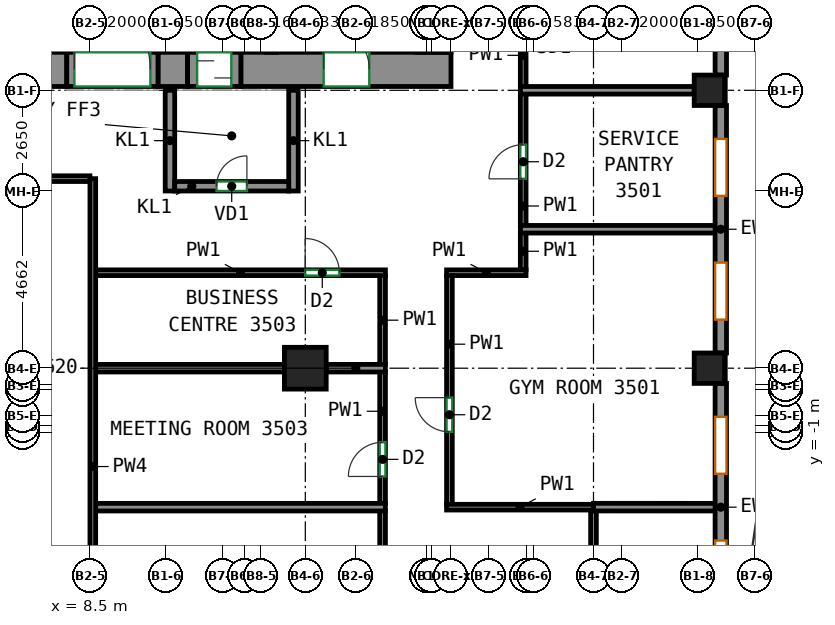
"""IFC4 building model, lengths in metres.
Left out: names, types, materials, properties, quantities, classifications, styles, units other than length and angle.
Written with IfcOpenShell. Run it as: python <this file> out.ifc"""

import sys

from ifc_helpers import new_model, si_unit, direction, frame, frame_2d, origin, origin_2d, place, context, subcontext, project, spatial, rectangle, extrude, source, transform, mapped, element, fill, save


model = new_model("IFC4")
c1 = context("Model", 3, precision=1e-05, world=origin(), true_north=direction((0.0, 1.0)))
c2 = subcontext(c1, "Body", "Model", "MODEL_VIEW")
j1 = project(units=[si_unit("LENGTHUNIT", "METRE"), si_unit("PLANEANGLEUNIT", "RADIAN")], contexts=[c1])
p1 = place(None, origin())
s1 = spatial("IfcSite", under=j1, at=p1, CompositionType="ELEMENT")
p2 = place(p1, origin())
s2 = spatial("IfcBuilding", under=s1, at=p2, CompositionType="ELEMENT")
p3 = place(p2, frame((0.0, 0.0, 154.1)))
s3 = spatial("IfcBuildingStorey", under=s2, at=p3, CompositionType="ELEMENT", Elevation=154.1)
m1 = source(origin(), c2, "Body", "SweptSolid", [
    extrude(rectangle(XDim=1.1, YDim=1.1, at=origin_2d()), origin(), (0.0, 0.0, 1.0), 3.12),
])
p4 = place(p3, frame((14.167, 0.688, 0.0), z_axis=(0.0, 0.0, 1.0), x_axis=(1.0, 0.0, 0.0)))
e1 = element("IfcColumn", 1, at=p4, inside=s3, PredefinedType="COLUMN", context=c2, shape_type="MappedRepresentation", body=[
    mapped(m1, transform((0.0, 0.0, 0.0))),
])
m2 = source(origin(), c2, "Body", "SweptSolid", [
    extrude(rectangle(XDim=0.8, YDim=0.8, at=origin_2d()), origin(), (0.0, 0.0, 1.0), 3.12),
])
for number, where, z_axis, x_axis in (
    (2, (24.8, 0.688, 0.0), (0.0, 0.0, 1.0), (1.0, 0.0, 0.0)),
    (3, (24.8, 8.0, 0.0), (0.0, 0.0, 1.0), (1.0, 0.0, 0.0)),
):
    element("IfcColumn", number, at=place(p3, frame(where, z_axis=z_axis, x_axis=x_axis)), inside=s3, PredefinedType="COLUMN", context=c2, shape_type="MappedRepresentation", body=[
        mapped(m2, transform((0.0, 0.0, 0.0))),
    ])
m3 = source(origin(), c2, "Body", "SweptSolid", [
    extrude(rectangle(XDim=14.18, YDim=0.9, at=frame_2d((7.09, 0.0))), origin(), (0.0, 0.0, 1.0), 3.12),
])
p5 = place(p3, frame((-6.29, 8.55, 0.0), z_axis=(0.0, 0.0, 1.0), x_axis=(1.0, 0.0, 0.0)))
e4 = element("IfcWall", 4, at=p5, inside=s3, PredefinedType="SHEAR", context=c2, shape_type="MappedRepresentation", body=[
    mapped(m3, transform((0.0, 0.0, 0.0))),
])
m4 = source(origin(), c2, "Body", "SweptSolid", [
    extrude(rectangle(XDim=0.78, YDim=0.9, at=frame_2d((0.39, 0.0))), origin(), (0.0, 0.0, 1.0), 3.12),
])
p6 = place(p3, frame((10.29, 8.55, 0.0), z_axis=(0.0, 0.0, 1.0), x_axis=(1.0, 0.0, 0.0)))
e5 = element("IfcWall", 5, at=p6, inside=s3, PredefinedType="SHEAR", context=c2, shape_type="MappedRepresentation", body=[
    mapped(m4, transform((0.0, 0.0, 0.0))),
])
m5 = source(origin(), c2, "Body", "SweptSolid", [
    extrude(rectangle(XDim=5.53, YDim=0.9, at=frame_2d((2.765, 0.0))), origin(), (0.0, 0.0, 1.0), 3.12),
])
p7 = place(p3, frame((12.47, 8.55, 0.0), z_axis=(0.0, 0.0, 1.0), x_axis=(1.0, 0.0, 0.0)))
e6 = element("IfcWall", 6, at=p7, inside=s3, PredefinedType="SHEAR", context=c2, shape_type="MappedRepresentation", body=[
    mapped(m5, transform((0.0, 0.0, 0.0))),
])
p8 = place(p7, frame((2.18, 0.0, 0.0)))
e7 = element("IfcOpeningElement", 7, at=p8, cuts=e6, PredefinedType="OPENING", context=c2, shape_type="SweptSolid", body=[
    extrude(rectangle(XDim=1.2, YDim=2.1, at=frame_2d((0.6, 1.05))), frame((0.0, 0.46, 0.0), z_axis=(0.0, -1.0, 0.0), x_axis=(1.0, 0.0, 0.0)), (0.0, 0.0, 1.0), 0.92),
])
m6 = source(origin(), c2, "Body", "SweptSolid", [
    extrude(rectangle(XDim=6.513, YDim=0.3, at=frame_2d((3.256, 0.0))), origin(), (0.0, 0.0, 1.0), 3.12),
])
p9 = place(p3, frame((25.1, -6.225, 0.0), z_axis=(0.0, 0.0, 1.0), x_axis=(0.0, 1.0, 0.0)))
e8 = element("IfcWall", 8, at=p9, inside=s3, PredefinedType="SOLIDWALL", context=c2, shape_type="MappedRepresentation", body=[
    mapped(m6, transform((0.0, 0.0, 0.0))),
])
p10 = place(p9, frame((0.878, 0.0, 0.85)))
e9 = element("IfcOpeningElement", 9, at=p10, cuts=e8, PredefinedType="OPENING", context=c2, shape_type="SweptSolid", body=[
    extrude(rectangle(XDim=1.5, YDim=1.95, at=frame_2d((0.75, 0.975))), frame((0.0, 0.16, 0.0), z_axis=(0.0, -1.0, 0.0), x_axis=(1.0, 0.0, 0.0)), (0.0, 0.0, 1.0), 0.32),
])
p11 = place(p9, frame((4.135, 0.0, 0.85)))
e10 = element("IfcOpeningElement", 10, at=p11, cuts=e8, PredefinedType="OPENING", context=c2, shape_type="SweptSolid", body=[
    extrude(rectangle(XDim=1.5, YDim=1.95, at=frame_2d((0.75, 0.975))), frame((0.0, 0.16, 0.0), z_axis=(0.0, -1.0, 0.0), x_axis=(1.0, 0.0, 0.0)), (0.0, 0.0, 1.0), 0.32),
])
p12 = place(p3, frame((25.1, 1.087, 0.0), z_axis=(0.0, 0.0, 1.0), x_axis=(0.0, 1.0, 0.0)))
e11 = element("IfcWall", 11, at=p12, inside=s3, PredefinedType="SOLIDWALL", context=c2, shape_type="MappedRepresentation", body=[
    mapped(m6, transform((0.0, 0.0, 0.0))),
])
p13 = place(p12, frame((0.878, 0.0, 0.85)))
e12 = element("IfcOpeningElement", 12, at=p13, cuts=e11, PredefinedType="OPENING", context=c2, shape_type="SweptSolid", body=[
    extrude(rectangle(XDim=1.5, YDim=1.95, at=frame_2d((0.75, 0.975))), frame((0.0, 0.16, 0.0), z_axis=(0.0, -1.0, 0.0), x_axis=(1.0, 0.0, 0.0)), (0.0, 0.0, 1.0), 0.32),
])
p14 = place(p12, frame((4.135, 0.0, 0.85)))
e13 = element("IfcOpeningElement", 13, at=p14, cuts=e11, PredefinedType="OPENING", context=c2, shape_type="SweptSolid", body=[
    extrude(rectangle(XDim=1.5, YDim=1.95, at=frame_2d((0.75, 0.975))), frame((0.0, 0.16, 0.0), z_axis=(0.0, -1.0, 0.0), x_axis=(1.0, 0.0, 0.0)), (0.0, 0.0, 1.0), 0.32),
])
m7 = source(origin(), c2, "Body", "SweptSolid", [
    extrude(rectangle(XDim=13.2, YDim=0.3, at=frame_2d((6.6, 0.0))), origin(), (0.0, 0.0, 1.0), 3.12),
])
p15 = place(p3, frame((25.1, 8.4, 0.0), z_axis=(0.0, 0.0, 1.0), x_axis=(0.0, 1.0, 0.0)))
e14 = element("IfcWall", 14, at=p15, inside=s3, PredefinedType="SOLIDWALL", context=c2, shape_type="MappedRepresentation", body=[
    mapped(m7, transform((0.0, 0.0, 0.0))),
])
p16 = place(p15, frame((0.9, 0.0, 0.85)))
e15 = element("IfcOpeningElement", 15, at=p16, cuts=e14, PredefinedType="OPENING", context=c2, shape_type="SweptSolid", body=[
    extrude(rectangle(XDim=1.5, YDim=1.95, at=frame_2d((0.75, 0.975))), frame((0.0, 0.16, 0.0), z_axis=(0.0, -1.0, 0.0), x_axis=(1.0, 0.0, 0.0)), (0.0, 0.0, 1.0), 0.32),
])
p17 = place(p15, frame((4.2, 0.0, 0.85)))
e16 = element("IfcOpeningElement", 16, at=p17, cuts=e14, PredefinedType="OPENING", context=c2, shape_type="SweptSolid", body=[
    extrude(rectangle(XDim=1.5, YDim=1.95, at=frame_2d((0.75, 0.975))), frame((0.0, 0.16, 0.0), z_axis=(0.0, -1.0, 0.0), x_axis=(1.0, 0.0, 0.0)), (0.0, 0.0, 1.0), 0.32),
])
p18 = place(p15, frame((7.5, 0.0, 0.85)))
e17 = element("IfcOpeningElement", 17, at=p18, cuts=e14, PredefinedType="OPENING", context=c2, shape_type="SweptSolid", body=[
    extrude(rectangle(XDim=1.5, YDim=1.95, at=frame_2d((0.75, 0.975))), frame((0.0, 0.16, 0.0), z_axis=(0.0, -1.0, 0.0), x_axis=(1.0, 0.0, 0.0)), (0.0, 0.0, 1.0), 0.32),
])
p19 = place(p15, frame((10.8, 0.0, 0.85)))
e18 = element("IfcOpeningElement", 18, at=p19, cuts=e14, PredefinedType="OPENING", context=c2, shape_type="SweptSolid", body=[
    extrude(rectangle(XDim=1.5, YDim=1.95, at=frame_2d((0.75, 0.975))), frame((0.0, 0.16, 0.0), z_axis=(0.0, -1.0, 0.0), x_axis=(1.0, 0.0, 0.0)), (0.0, 0.0, 1.0), 0.32),
])
m8 = source(origin(), c2, "Body", "SweptSolid", [
    extrude(rectangle(XDim=2.65, YDim=0.25, at=frame_2d((1.325, 0.0))), origin(), (0.0, 0.0, 1.0), 3.12),
])
for number, where, z_axis, x_axis in (
    (19, (10.605, 5.35, 0.0), (0.0, 0.0, 1.0), (0.0, 1.0, 0.0)),
    (20, (13.855, 5.35, 0.0), (0.0, 0.0, 1.0), (0.0, 1.0, 0.0)),
):
    element("IfcWall", number, at=place(p3, frame(where, z_axis=z_axis, x_axis=x_axis)), inside=s3, PredefinedType="PARTITIONING", context=c2, shape_type="MappedRepresentation", body=[
        mapped(m8, transform((0.0, 0.0, 0.0))),
    ])
m9 = source(origin(), c2, "Body", "SweptSolid", [
    extrude(rectangle(XDim=3.0, YDim=0.25, at=frame_2d((1.5, 0.0))), origin(), (0.0, 0.0, 1.0), 3.12),
])
p20 = place(p3, frame((10.73, 5.475, 0.0), z_axis=(0.0, 0.0, 1.0), x_axis=(1.0, 0.0, 0.0)))
e21 = element("IfcWall", 21, at=p20, inside=s3, PredefinedType="PARTITIONING", context=c2, shape_type="MappedRepresentation", body=[
    mapped(m9, transform((0.0, 0.0, 0.0))),
])
p21 = place(p20, frame((1.1, 0.0, 0.0)))
e22 = element("IfcOpeningElement", 22, at=p21, cuts=e21, PredefinedType="OPENING", context=c2, shape_type="SweptSolid", body=[
    extrude(rectangle(XDim=0.8, YDim=2.0, at=frame_2d((0.4, 1.0))), frame((0.0, 0.135, 0.0), z_axis=(0.0, -1.0, 0.0), x_axis=(1.0, 0.0, 0.0)), (0.0, 0.0, 1.0), 0.27),
])
m10 = source(origin(), c2, "Body", "SweptSolid", [
    extrude(rectangle(XDim=2.4, YDim=0.9, at=frame_2d((1.2, 0.0))), origin(), (0.0, 0.0, 1.0), 2.7),
])
p22 = place(p3, frame((7.89, 8.55, 0.0), z_axis=(0.0, 0.0, 1.0), x_axis=(1.0, 0.0, 0.0)))
e23 = element("IfcWall", 23, at=p22, inside=s3, PredefinedType="PARTITIONING", context=c2, shape_type="MappedRepresentation", body=[
    mapped(m10, transform((0.0, 0.0, 0.0))),
])
p23 = place(p22, frame((0.2, 0.0, 0.0)))
e24 = element("IfcOpeningElement", 24, at=p23, cuts=e23, PredefinedType="OPENING", context=c2, shape_type="SweptSolid", body=[
    extrude(rectangle(XDim=2.0, YDim=2.1, at=frame_2d((1.0, 1.05))), frame((0.0, 0.46, 0.0), z_axis=(0.0, -1.0, 0.0), x_axis=(1.0, 0.0, 0.0)), (0.0, 0.0, 1.0), 0.92),
])
m11 = source(origin(), c2, "Body", "SweptSolid", [
    extrude(rectangle(XDim=1.4, YDim=0.9, at=frame_2d((0.7, 0.0))), origin(), (0.0, 0.0, 1.0), 2.7),
])
p24 = place(p3, frame((11.07, 8.55, 0.0), z_axis=(0.0, 0.0, 1.0), x_axis=(1.0, 0.0, 0.0)))
e25 = element("IfcWall", 25, at=p24, inside=s3, PredefinedType="PARTITIONING", context=c2, shape_type="MappedRepresentation", body=[
    mapped(m11, transform((0.0, 0.0, 0.0))),
])
p25 = place(p24, frame((0.25, 0.0, 0.0)))
e26 = element("IfcOpeningElement", 26, at=p25, cuts=e25, PredefinedType="OPENING", context=c2, shape_type="SweptSolid", body=[
    extrude(rectangle(XDim=0.9, YDim=2.1, at=frame_2d((0.45, 1.05))), frame((0.0, 0.46, 0.0), z_axis=(0.0, -1.0, 0.0), x_axis=(1.0, 0.0, 0.0)), (0.0, 0.0, 1.0), 0.92),
])
p26 = place(p3, frame((19.9, 4.434, 0.0), z_axis=(0.0, 0.0, 1.0), x_axis=(0.0, 1.0, 0.0)))
e27 = element("IfcWall", 27, at=p26, inside=s3, PredefinedType="PARTITIONING", context=c2, shape_type="SweptSolid", body=[
    extrude(rectangle(XDim=3.476, YDim=0.15, at=frame_2d((1.738, 0.0))), origin(), (0.0, 0.0, 1.0), 3.12),
])
p27 = place(p26, frame((1.236, 0.0, 0.0)))
e28 = element("IfcOpeningElement", 28, at=p27, cuts=e27, PredefinedType="OPENING", context=c2, shape_type="SweptSolid", body=[
    extrude(rectangle(XDim=0.9, YDim=2.1, at=frame_2d((0.45, 1.05))), frame((0.0, 0.085, 0.0), z_axis=(0.0, -1.0, 0.0), x_axis=(1.0, 0.0, 0.0)), (0.0, 0.0, 1.0), 0.17),
])
p28 = place(p3, frame((19.9, 8.09, 0.0), z_axis=(0.0, 0.0, 1.0), x_axis=(0.0, 1.0, 0.0)))
e29 = element("IfcWall", 29, at=p28, inside=s3, PredefinedType="PARTITIONING", context=c2, shape_type="SweptSolid", body=[
    extrude(rectangle(XDim=1.66, YDim=0.15, at=frame_2d((0.83, 0.0))), origin(), (0.0, 0.0, 1.0), 3.12),
])
p29 = place(p3, frame((19.9, 3.275, 0.0), z_axis=(0.0, 0.0, 1.0), x_axis=(0.0, 1.0, 0.0)))
e30 = element("IfcWall", 30, at=p29, inside=s3, PredefinedType="PARTITIONING", context=c2, shape_type="SweptSolid", body=[
    extrude(rectangle(XDim=0.979, YDim=0.15, at=frame_2d((0.49, 0.0))), origin(), (0.0, 0.0, 1.0), 3.12),
])
p30 = place(p3, frame((17.884, 3.2, 0.0), z_axis=(0.0, 0.0, 1.0), x_axis=(1.0, 0.0, 0.0)))
e31 = element("IfcWall", 31, at=p30, inside=s3, PredefinedType="PARTITIONING", context=c2, shape_type="SweptSolid", body=[
    extrude(rectangle(XDim=2.091, YDim=0.15, at=frame_2d((1.045, 0.0))), origin(), (0.0, 0.0, 1.0), 3.12),
])
p31 = place(p3, frame((17.959, -2.894, 0.0), z_axis=(0.0, 0.0, 1.0), x_axis=(0.0, 1.0, 0.0)))
e32 = element("IfcWall", 32, at=p31, inside=s3, PredefinedType="PARTITIONING", context=c2, shape_type="SweptSolid", body=[
    extrude(rectangle(XDim=6.019, YDim=0.15, at=frame_2d((3.01, 0.0))), origin(), (0.0, 0.0, 1.0), 3.12),
])
p32 = place(p31, frame((1.907, 0.0, 0.0)))
e33 = element("IfcOpeningElement", 33, at=p32, cuts=e32, PredefinedType="OPENING", context=c2, shape_type="SweptSolid", body=[
    extrude(rectangle(XDim=0.9, YDim=2.1, at=frame_2d((0.45, 1.05))), frame((0.0, 0.085, 0.0), z_axis=(0.0, -1.0, 0.0), x_axis=(1.0, 0.0, 0.0)), (0.0, 0.0, 1.0), 0.17),
])
p33 = place(p3, frame((21.751, -2.969, 0.0), z_axis=(0.0, 0.0, 1.0), x_axis=(-1.0, 0.0, 0.0)))
e34 = element("IfcWall", 34, at=p33, inside=s3, PredefinedType="PARTITIONING", context=c2, shape_type="SweptSolid", body=[
    extrude(rectangle(XDim=3.867, YDim=0.15, at=frame_2d((1.934, 0.0))), origin(), (0.0, 0.0, 1.0), 3.12),
])
p34 = place(p3, frame((21.75, -7.75, 0.0), z_axis=(0.0, 0.0, 1.0), x_axis=(0.0, 1.0, 0.0)))
e35 = element("IfcWall", 35, at=p34, inside=s3, PredefinedType="PARTITIONING", context=c2, shape_type="SweptSolid", body=[
    extrude(rectangle(XDim=4.682, YDim=0.15, at=frame_2d((2.341, 0.0))), origin(), (0.0, 0.0, 1.0), 3.12),
])
p35 = place(p34, frame((1.602, 0.0, 0.0)))
e36 = element("IfcOpeningElement", 36, at=p35, cuts=e35, PredefinedType="OPENING", context=c2, shape_type="SweptSolid", body=[
    extrude(rectangle(XDim=0.9, YDim=2.1, at=frame_2d((0.45, 1.05))), frame((0.0, 0.085, 0.0), z_axis=(0.0, -1.0, 0.0), x_axis=(1.0, 0.0, 0.0)), (0.0, 0.0, 1.0), 0.17),
])
p36 = place(p3, frame((16.2, -11.425, 0.0), z_axis=(0.0, 0.0, 1.0), x_axis=(0.0, 1.0, 0.0)))
e37 = element("IfcWall", 37, at=p36, inside=s3, PredefinedType="PARTITIONING", context=c2, shape_type="SweptSolid", body=[
    extrude(rectangle(XDim=8.366, YDim=0.15, at=frame_2d((4.183, 0.0))), origin(), (0.0, 0.0, 1.0), 3.12),
])
p37 = place(p36, frame((3.935, 0.0, 0.0)))
e38 = element("IfcOpeningElement", 38, at=p37, cuts=e37, PredefinedType="OPENING", context=c2, shape_type="SweptSolid", body=[
    extrude(rectangle(XDim=0.9, YDim=2.1, at=frame_2d((0.45, 1.05))), frame((0.0, 0.085, 0.0), z_axis=(0.0, -1.0, 0.0), x_axis=(1.0, 0.0, 0.0)), (0.0, 0.0, 1.0), 0.17),
])
p38 = place(p3, frame((16.2, -2.879, 0.0), z_axis=(0.0, 0.0, 1.0), x_axis=(0.0, 1.0, 0.0)))
e39 = element("IfcWall", 39, at=p38, inside=s3, PredefinedType="PARTITIONING", context=c2, shape_type="SweptSolid", body=[
    extrude(rectangle(XDim=3.477, YDim=0.15, at=frame_2d((1.738, 0.0))), origin(), (0.0, 0.0, 1.0), 3.12),
])
p39 = place(p38, frame((0.718, 0.0, 0.0)))
e40 = element("IfcOpeningElement", 40, at=p39, cuts=e39, PredefinedType="OPENING", context=c2, shape_type="SweptSolid", body=[
    extrude(rectangle(XDim=0.9, YDim=2.1, at=frame_2d((0.45, 1.05))), frame((0.0, 0.085, 0.0), z_axis=(0.0, -1.0, 0.0), x_axis=(1.0, 0.0, 0.0)), (0.0, 0.0, 1.0), 0.17),
])
p40 = place(p3, frame((16.2, 0.778, 0.0), z_axis=(0.0, 0.0, 1.0), x_axis=(0.0, 1.0, 0.0)))
e41 = element("IfcWall", 41, at=p40, inside=s3, PredefinedType="PARTITIONING", context=c2, shape_type="SweptSolid", body=[
    extrude(rectangle(XDim=2.347, YDim=0.15, at=frame_2d((1.173, 0.0))), origin(), (0.0, 0.0, 1.0), 3.12),
])
p41 = place(p3, frame((8.65, 3.2, 0.0), z_axis=(0.0, 0.0, 1.0), x_axis=(1.0, 0.0, 0.0)))
e42 = element("IfcWall", 42, at=p41, inside=s3, PredefinedType="PARTITIONING", context=c2, shape_type="SweptSolid", body=[
    extrude(rectangle(XDim=7.625, YDim=0.15, at=frame_2d((3.812, 0.0))), origin(), (0.0, 0.0, 1.0), 3.12),
])
p42 = place(p41, frame((5.513, 0.0, 0.0)))
e43 = element("IfcOpeningElement", 43, at=p42, cuts=e42, PredefinedType="OPENING", context=c2, shape_type="SweptSolid", body=[
    extrude(rectangle(XDim=0.9, YDim=2.1, at=frame_2d((0.45, 1.05))), frame((0.0, 0.085, 0.0), z_axis=(0.0, -1.0, 0.0), x_axis=(1.0, 0.0, 0.0)), (0.0, 0.0, 1.0), 0.17),
])
p43 = place(p3, frame((19.827, 8.0, 0.0), z_axis=(0.0, 0.0, 1.0), x_axis=(1.0, 0.0, 0.0)))
e44 = element("IfcWall", 44, at=p43, inside=s3, PredefinedType="PARTITIONING", context=c2, shape_type="SweptSolid", body=[
    extrude(rectangle(XDim=4.573, YDim=0.2, at=frame_2d((2.287, 0.0))), origin(), (0.0, 0.0, 1.0), 3.12),
])
p44 = place(p3, frame((19.827, 4.344, 0.0), z_axis=(0.0, 0.0, 1.0), x_axis=(1.0, 0.0, 0.0)))
e45 = element("IfcWall", 45, at=p44, inside=s3, PredefinedType="PARTITIONING", context=c2, shape_type="SweptSolid", body=[
    extrude(rectangle(XDim=5.173, YDim=0.2, at=frame_2d((2.586, 0.0))), origin(), (0.0, 0.0, 1.0), 3.12),
])
p45 = place(p3, frame((21.751, -2.968, 0.0), z_axis=(0.0, 0.0, 1.0), x_axis=(0.999999954829, -0.000300571071, 0.0)))
e46 = element("IfcWall", 46, at=p45, inside=s3, PredefinedType="PARTITIONING", context=c2, shape_type="SweptSolid", body=[
    extrude(rectangle(XDim=3.249, YDim=0.2, at=frame_2d((1.625, 0.0))), origin(), (0.0, 0.0, 1.0), 3.12),
])
p46 = place(p3, frame((8.65, -2.969, 0.0), z_axis=(0.0, 0.0, 1.0), x_axis=(1.0, 0.0, 0.0)))
e47 = element("IfcWall", 47, at=p46, inside=s3, PredefinedType="PARTITIONING", context=c2, shape_type="SweptSolid", body=[
    extrude(rectangle(XDim=7.623, YDim=0.2, at=frame_2d((3.812, 0.0))), origin(), (0.0, 0.0, 1.0), 3.12),
])
p47 = place(p3, frame((14.717, 0.688, 0.0), z_axis=(0.0, 0.0, 1.0), x_axis=(1.0, 0.0, 0.0)))
e48 = element("IfcWall", 48, at=p47, inside=s3, PredefinedType="PARTITIONING", context=c2, shape_type="SweptSolid", body=[
    extrude(rectangle(XDim=1.556, YDim=0.2, at=frame_2d((0.778, 0.0))), origin(), (0.0, 0.0, 1.0), 2.52),
])
p48 = place(p3, frame((8.65, 0.688, 0.0), z_axis=(0.0, 0.0, 1.0), x_axis=(1.0, 0.0, 0.0)))
e49 = element("IfcWall", 49, at=p48, inside=s3, PredefinedType="PARTITIONING", context=c2, shape_type="SweptSolid", body=[
    extrude(rectangle(XDim=4.967, YDim=0.2, at=frame_2d((2.483, 0.0))), origin(), (0.0, 0.0, 1.0), 3.12),
])
p49 = place(p3, frame((-6.575, 5.675, 0.0), z_axis=(0.0, 0.0, 1.0), x_axis=(1.0, 0.0, 0.0)))
e50 = element("IfcWall", 50, at=p49, inside=s3, PredefinedType="PARTITIONING", context=c2, shape_type="SweptSolid", body=[
    extrude(rectangle(XDim=15.075, YDim=0.15, at=frame_2d((7.538, 0.0))), origin(), (0.0, 0.0, 1.0), 3.12),
])
p50 = place(p3, frame((8.575, 5.675, 0.0), z_axis=(0.0, 0.0, 1.0), x_axis=(0.0, -1.0, 0.0)))
e51 = element("IfcWall", 51, at=p50, inside=s3, PredefinedType="PARTITIONING", context=c2, shape_type="SweptSolid", body=[
    extrude(rectangle(XDim=15.15, YDim=0.15, at=frame_2d((7.575, 0.0))), origin(), (0.0, 0.0, 1.0), 3.12),
])
p51 = place(p10, origin())
e52 = element("IfcWindow", 52, at=p51, inside=s3, PartitioningType="SINGLE_PANEL", PredefinedType="WINDOW", context=c2, shape_type="SweptSolid", body=[
    extrude(rectangle(XDim=1.5, YDim=1.95, at=frame_2d((0.75, 0.975))), frame((0.0, 0.03, 0.0), z_axis=(0.0, -1.0, 0.0), x_axis=(1.0, 0.0, 0.0)), (0.0, 0.0, 1.0), 0.06),
])
fill(e9, e52)
p52 = place(p11, origin())
e53 = element("IfcWindow", 53, at=p52, inside=s3, PartitioningType="SINGLE_PANEL", PredefinedType="WINDOW", context=c2, shape_type="SweptSolid", body=[
    extrude(rectangle(XDim=1.5, YDim=1.95, at=frame_2d((0.75, 0.975))), frame((0.0, 0.03, 0.0), z_axis=(0.0, -1.0, 0.0), x_axis=(1.0, 0.0, 0.0)), (0.0, 0.0, 1.0), 0.06),
])
fill(e10, e53)
p53 = place(p13, origin())
e54 = element("IfcWindow", 54, at=p53, inside=s3, PartitioningType="SINGLE_PANEL", PredefinedType="WINDOW", context=c2, shape_type="SweptSolid", body=[
    extrude(rectangle(XDim=1.5, YDim=1.95, at=frame_2d((0.75, 0.975))), frame((0.0, 0.03, 0.0), z_axis=(0.0, -1.0, 0.0), x_axis=(1.0, 0.0, 0.0)), (0.0, 0.0, 1.0), 0.06),
])
fill(e12, e54)
p54 = place(p14, origin())
e55 = element("IfcWindow", 55, at=p54, inside=s3, PartitioningType="SINGLE_PANEL", PredefinedType="WINDOW", context=c2, shape_type="SweptSolid", body=[
    extrude(rectangle(XDim=1.5, YDim=1.95, at=frame_2d((0.75, 0.975))), frame((0.0, 0.03, 0.0), z_axis=(0.0, -1.0, 0.0), x_axis=(1.0, 0.0, 0.0)), (0.0, 0.0, 1.0), 0.06),
])
fill(e13, e55)
p55 = place(p23, origin())
e56 = element("IfcDoor", 56, at=p55, inside=s3, OperationType="DOUBLE_DOOR_SINGLE_SWING", PredefinedType="DOOR", context=c2, shape_type="SweptSolid", body=[
    extrude(rectangle(XDim=2.0, YDim=2.1, at=frame_2d((1.0, 1.05))), frame((0.0, 0.355, 0.0), z_axis=(0.0, -1.0, 0.0), x_axis=(1.0, 0.0, 0.0)), (0.0, 0.0, 1.0), 0.05),
])
fill(e24, e56)
p56 = place(p21, origin())
e57 = element("IfcDoor", 57, at=p56, inside=s3, OperationType="SINGLE_SWING_RIGHT", PredefinedType="DOOR", context=c2, shape_type="SweptSolid", body=[
    extrude(rectangle(XDim=0.8, YDim=2.0, at=frame_2d((0.4, 1.0))), frame((0.0, 0.025, 0.0), z_axis=(0.0, -1.0, 0.0), x_axis=(1.0, 0.0, 0.0)), (0.0, 0.0, 1.0), 0.05),
])
fill(e22, e57)
p57 = place(p25, origin())
e58 = element("IfcDoor", 58, at=p57, inside=s3, OperationType="SLIDING_TO_LEFT", PredefinedType="DOOR", context=c2, shape_type="SweptSolid", body=[
    extrude(rectangle(XDim=0.9, YDim=2.1, at=frame_2d((0.45, 1.05))), frame((0.0, 0.355, 0.0), z_axis=(0.0, -1.0, 0.0), x_axis=(1.0, 0.0, 0.0)), (0.0, 0.0, 1.0), 0.05),
])
fill(e26, e58)
p58 = place(p8, origin())
e59 = element("IfcDoor", 59, at=p58, inside=s3, OperationType="DOUBLE_DOOR_SINGLE_SWING", PredefinedType="DOOR", context=c2, shape_type="SweptSolid", body=[
    extrude(rectangle(XDim=1.2, YDim=2.1, at=frame_2d((0.6, 1.05))), frame((0.0, 0.355, 0.0), z_axis=(0.0, -1.0, 0.0), x_axis=(1.0, 0.0, 0.0)), (0.0, 0.0, 1.0), 0.05),
])
fill(e7, e59)
p59 = place(p39, origin())
e60 = element("IfcDoor", 60, at=p59, inside=s3, OperationType="SINGLE_SWING_LEFT", PredefinedType="DOOR", context=c2, shape_type="SweptSolid", body=[
    extrude(rectangle(XDim=0.9, YDim=2.1, at=frame_2d((0.45, 1.05))), frame((0.0, 0.025, 0.0), z_axis=(0.0, -1.0, 0.0), x_axis=(1.0, 0.0, 0.0)), (0.0, 0.0, 1.0), 0.05),
])
fill(e40, e60)
p60 = place(p32, origin())
e61 = element("IfcDoor", 61, at=p60, inside=s3, OperationType="SINGLE_SWING_RIGHT", PredefinedType="DOOR", context=c2, shape_type="SweptSolid", body=[
    extrude(rectangle(XDim=0.9, YDim=2.1, at=frame_2d((0.45, 1.05))), frame((0.0, 0.025, 0.0), z_axis=(0.0, -1.0, 0.0), x_axis=(1.0, 0.0, 0.0)), (0.0, 0.0, 1.0), 0.05),
])
fill(e33, e61)
p61 = place(p42, origin())
e62 = element("IfcDoor", 62, at=p61, inside=s3, OperationType="SINGLE_SWING_LEFT", PredefinedType="DOOR", context=c2, shape_type="SweptSolid", body=[
    extrude(rectangle(XDim=0.9, YDim=2.1, at=frame_2d((0.45, 1.05))), frame((0.0, 0.025, 0.0), z_axis=(0.0, -1.0, 0.0), x_axis=(1.0, 0.0, 0.0)), (0.0, 0.0, 1.0), 0.05),
])
fill(e43, e62)
p62 = place(p27, origin())
e63 = element("IfcDoor", 63, at=p62, inside=s3, OperationType="SINGLE_SWING_LEFT", PredefinedType="DOOR", context=c2, shape_type="SweptSolid", body=[
    extrude(rectangle(XDim=0.9, YDim=2.1, at=frame_2d((0.45, 1.05))), frame((0.0, 0.025, 0.0), z_axis=(0.0, -1.0, 0.0), x_axis=(1.0, 0.0, 0.0)), (0.0, 0.0, 1.0), 0.05),
])
fill(e28, e63)
save(model, sys.argv[1])
